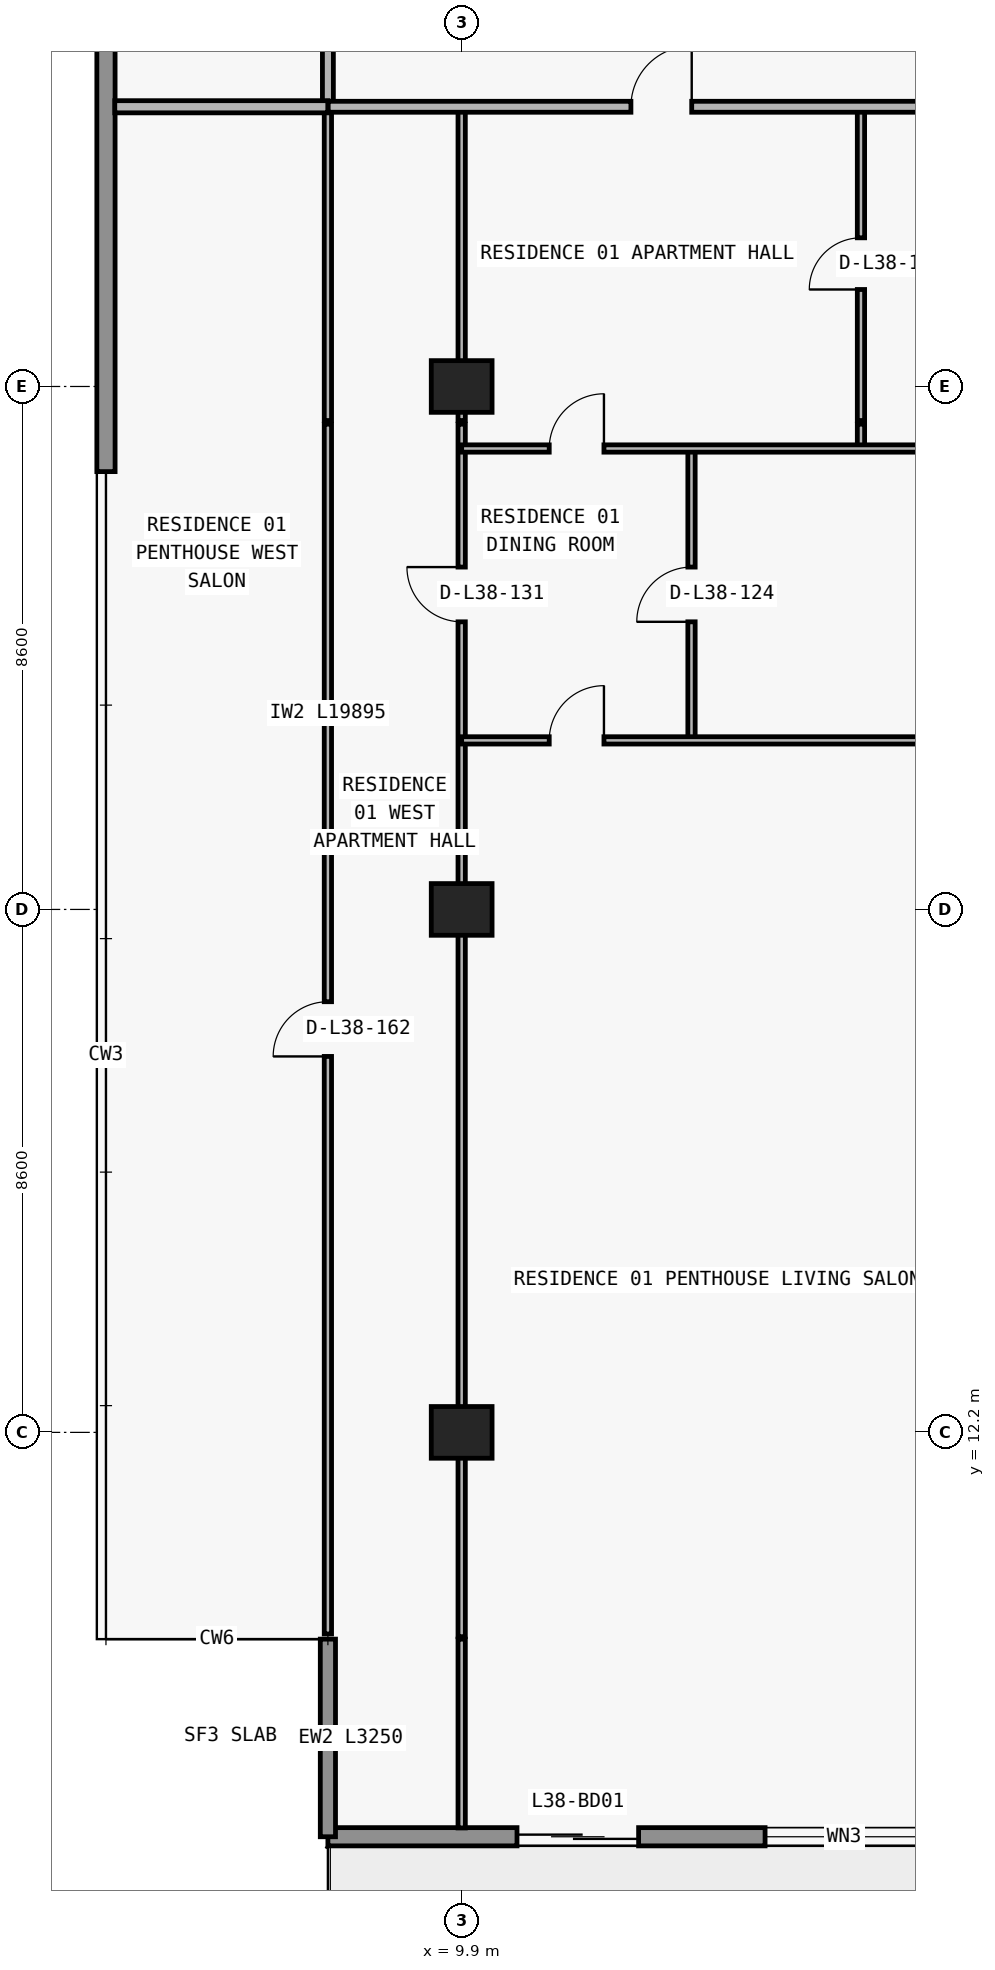
"""IFC4 building model, lengths in metres.
Left out: names, types, materials, properties, quantities, classifications, styles, units other than length and angle.
Written with IfcOpenShell. Run it as: python <this file> out.ifc"""

import sys

from ifc_helpers import new_model, si_unit, direction, frame, frame_2d, origin, origin_2d, place, context, subcontext, project, spatial, rectangle, extrude, element, fill, save


model = new_model("IFC4")
c1 = context("Model", 3, precision=1e-05, world=origin(), true_north=direction((0.0, 1.0)))
c2 = subcontext(c1, "Body", "Model", "MODEL_VIEW")
j1 = project(units=[si_unit("LENGTHUNIT", "METRE"), si_unit("PLANEANGLEUNIT", "RADIAN")], contexts=[c1])
p1 = place(None, origin())
s1 = spatial("IfcSite", under=j1, at=p1, CompositionType="ELEMENT")
p2 = place(p1, origin())
s2 = spatial("IfcBuilding", under=s1, at=p2, CompositionType="ELEMENT")
p3 = place(p2, frame((0.0, 0.0, 138.9)))
s3 = spatial("IfcBuildingStorey", under=s2, at=p3, CompositionType="ELEMENT", Elevation=138.9)
for number, where, z_axis, x_axis in (
    (1, (9.9, 12.2, 0.0), (0.0, 0.0, 1.0), (1.0, 0.0, 0.0)),
    (2, (9.9, 20.8, 0.0), (0.0, 0.0, 1.0), (1.0, 0.0, 0.0)),
    (3, (9.9, 29.4, 0.0), (0.0, 0.0, 1.0), (1.0, 0.0, 0.0)),
):
    element("IfcColumn", number, at=place(p3, frame(where, z_axis=z_axis, x_axis=x_axis)), inside=s3, PredefinedType="COLUMN", context=c2, shape_type="SweptSolid", body=[
        extrude(rectangle(XDim=1.0, YDim=0.85, at=origin_2d()), origin(), (0.0, 0.0, 1.0), 3.05),
    ])
p4 = place(p3, frame((70.1, 5.55, 0.0), z_axis=(0.0, 0.0, 1.0), x_axis=(-1.0, 0.0, 0.0)))
e4 = element("IfcWall", 4, at=p4, inside=s3, PredefinedType="STANDARD", context=c2, shape_type="SweptSolid", body=[
    extrude(rectangle(XDim=62.4, YDim=0.3, at=frame_2d((31.2, 0.0))), origin(), (0.0, 0.0, 1.0), 3.05),
])
p5 = place(p4, frame((57.29, 0.0, 0.0)))
e5 = element("IfcOpeningElement", 5, at=p5, cuts=e4, PredefinedType="OPENING", context=c2, shape_type="SweptSolid", body=[
    extrude(rectangle(XDim=2.0, YDim=2.3, at=frame_2d((1.0, 1.15))), frame((0.0, 0.16, 0.0), z_axis=(0.0, -1.0, 0.0), x_axis=(1.0, 0.0, 0.0)), (0.0, 0.0, 1.0), 0.32),
])
p6 = place(p4, frame((52.61, 0.0, 0.65)))
e6 = element("IfcOpeningElement", 6, at=p6, cuts=e4, PredefinedType="OPENING", context=c2, shape_type="SweptSolid", body=[
    extrude(rectangle(XDim=2.6, YDim=1.85, at=frame_2d((1.3, 0.925))), frame((0.0, 0.16, 0.0), z_axis=(0.0, -1.0, 0.0), x_axis=(1.0, 0.0, 0.0)), (0.0, 0.0, 1.0), 0.32),
])
p7 = place(p4, frame((46.5, 0.0, 0.85)))
e7 = element("IfcOpeningElement", 7, at=p7, cuts=e4, PredefinedType="OPENING", context=c2, shape_type="SweptSolid", body=[
    extrude(rectangle(XDim=2.2, YDim=1.55, at=frame_2d((1.1, 0.775))), frame((0.0, 0.16, 0.0), z_axis=(0.0, -1.0, 0.0), x_axis=(1.0, 0.0, 0.0)), (0.0, 0.0, 1.0), 0.32),
])
p8 = place(p4, frame((40.49, 0.0, 0.0)))
e8 = element("IfcOpeningElement", 8, at=p8, cuts=e4, PredefinedType="OPENING", context=c2, shape_type="SweptSolid", body=[
    extrude(rectangle(XDim=2.0, YDim=2.3, at=frame_2d((1.0, 1.15))), frame((0.0, 0.16, 0.0), z_axis=(0.0, -1.0, 0.0), x_axis=(1.0, 0.0, 0.0)), (0.0, 0.0, 1.0), 0.32),
])
p9 = place(p4, frame((35.81, 0.0, 0.65)))
e9 = element("IfcOpeningElement", 9, at=p9, cuts=e4, PredefinedType="OPENING", context=c2, shape_type="SweptSolid", body=[
    extrude(rectangle(XDim=2.6, YDim=1.85, at=frame_2d((1.3, 0.925))), frame((0.0, 0.16, 0.0), z_axis=(0.0, -1.0, 0.0), x_axis=(1.0, 0.0, 0.0)), (0.0, 0.0, 1.0), 0.32),
])
p10 = place(p4, frame((30.1, 0.0, 0.85)))
e10 = element("IfcOpeningElement", 10, at=p10, cuts=e4, PredefinedType="OPENING", context=c2, shape_type="SweptSolid", body=[
    extrude(rectangle(XDim=2.2, YDim=1.55, at=frame_2d((1.1, 0.775))), frame((0.0, 0.16, 0.0), z_axis=(0.0, -1.0, 0.0), x_axis=(1.0, 0.0, 0.0)), (0.0, 0.0, 1.0), 0.32),
])
p11 = place(p4, frame((22.1, 0.0, 0.85)))
e11 = element("IfcOpeningElement", 11, at=p11, cuts=e4, PredefinedType="OPENING", context=c2, shape_type="SweptSolid", body=[
    extrude(rectangle(XDim=2.2, YDim=1.55, at=frame_2d((1.1, 0.775))), frame((0.0, 0.16, 0.0), z_axis=(0.0, -1.0, 0.0), x_axis=(1.0, 0.0, 0.0)), (0.0, 0.0, 1.0), 0.32),
])
p12 = place(p4, frame((16.026, 0.0, 0.0)))
e12 = element("IfcOpeningElement", 12, at=p12, cuts=e4, PredefinedType="OPENING", context=c2, shape_type="SweptSolid", body=[
    extrude(rectangle(XDim=2.0, YDim=2.3, at=frame_2d((1.0, 1.15))), frame((0.0, 0.16, 0.0), z_axis=(0.0, -1.0, 0.0), x_axis=(1.0, 0.0, 0.0)), (0.0, 0.0, 1.0), 0.32),
])
p13 = place(p4, frame((11.726, 0.0, 0.85)))
e13 = element("IfcOpeningElement", 13, at=p13, cuts=e4, PredefinedType="OPENING", context=c2, shape_type="SweptSolid", body=[
    extrude(rectangle(XDim=2.2, YDim=1.55, at=frame_2d((1.1, 0.775))), frame((0.0, 0.16, 0.0), z_axis=(0.0, -1.0, 0.0), x_axis=(1.0, 0.0, 0.0)), (0.0, 0.0, 1.0), 0.32),
])
p14 = place(p4, frame((7.29, 0.0, 0.0)))
e14 = element("IfcOpeningElement", 14, at=p14, cuts=e4, PredefinedType="OPENING", context=c2, shape_type="SweptSolid", body=[
    extrude(rectangle(XDim=2.0, YDim=2.3, at=frame_2d((1.0, 1.15))), frame((0.0, 0.16, 0.0), z_axis=(0.0, -1.0, 0.0), x_axis=(1.0, 0.0, 0.0)), (0.0, 0.0, 1.0), 0.32),
])
p15 = place(p4, frame((3.19, 0.0, 0.85)))
e15 = element("IfcOpeningElement", 15, at=p15, cuts=e4, PredefinedType="OPENING", context=c2, shape_type="SweptSolid", body=[
    extrude(rectangle(XDim=1.8, YDim=1.55, at=frame_2d((0.9, 0.775))), frame((0.0, 0.16, 0.0), z_axis=(0.0, -1.0, 0.0), x_axis=(1.0, 0.0, 0.0)), (0.0, 0.0, 1.0), 0.32),
])
p16 = place(p3, frame((7.7, 8.8, 0.0), z_axis=(0.0, 0.0, 1.0), x_axis=(0.0, -1.0, 0.0)))
e16 = element("IfcWall", 16, at=p16, inside=s3, PredefinedType="ELEMENTEDWALL", context=c2, shape_type="SweptSolid", body=[
    extrude(rectangle(XDim=3.25, YDim=0.25, at=frame_2d((1.625, 0.0))), origin(), (0.0, 0.0, 1.0), 3.05),
])
p17 = place(p3, frame((4.05, 28.0, 0.0), z_axis=(0.0, 0.0, 1.0), x_axis=(0.0, 1.0, 0.0)))
e17 = element("IfcWall", 17, at=p17, inside=s3, PredefinedType="STANDARD", context=c2, shape_type="SweptSolid", body=[
    extrude(rectangle(XDim=19.2, YDim=0.3, at=frame_2d((9.6, 0.0))), origin(), (0.0, 0.0, 1.0), 3.05),
])
p18 = place(p3, frame((7.7, 8.885, 0.0), z_axis=(0.0, 0.0, 1.0), x_axis=(0.0, 1.0, 0.0)))
e18 = element("IfcWall", 18, at=p18, inside=s3, PredefinedType="PARTITIONING", context=c2, shape_type="SweptSolid", body=[
    extrude(rectangle(XDim=19.895, YDim=0.12, at=frame_2d((9.948, 0.0))), origin(), (0.0, 0.0, 1.0), 3.05),
])
p19 = place(p18, frame((9.498, 0.0, 0.0)))
e19 = element("IfcOpeningElement", 19, at=p19, cuts=e18, PredefinedType="OPENING", context=c2, shape_type="SweptSolid", body=[
    extrude(rectangle(XDim=0.9, YDim=2.15, at=frame_2d((0.45, 1.075))), frame((0.0, 0.07, 0.0), z_axis=(0.0, -1.0, 0.0), x_axis=(1.0, 0.0, 0.0)), (0.0, 0.0, 1.0), 0.14),
])
p20 = place(p3, frame((7.7, 28.84, 0.0), z_axis=(0.0, 0.0, 1.0), x_axis=(0.0, 1.0, 0.0)))
e20 = element("IfcWall", 20, at=p20, inside=s3, PredefinedType="PARTITIONING", context=c2, shape_type="SweptSolid", body=[
    extrude(rectangle(XDim=5.16, YDim=0.12, at=frame_2d((2.58, 0.0))), origin(), (0.0, 0.0, 1.0), 3.05),
])
p21 = place(p3, frame((7.7, 34.005, 0.0), z_axis=(0.0, 0.0, 1.0), x_axis=(0.0, 1.0, 0.0)))
e21 = element("IfcWall", 21, at=p21, inside=s3, PredefinedType="PARTITIONING", context=c2, shape_type="SweptSolid", body=[
    extrude(rectangle(XDim=2.945, YDim=0.18, at=frame_2d((1.473, 0.0))), origin(), (0.0, 0.0, 1.0), 3.05),
])
p22 = place(p3, frame((9.9, 5.695, 0.0), z_axis=(0.0, 0.0, 1.0), x_axis=(0.0, 1.0, 0.0)))
e22 = element("IfcWall", 22, at=p22, inside=s3, PredefinedType="PARTITIONING", context=c2, shape_type="SweptSolid", body=[
    extrude(rectangle(XDim=3.105, YDim=0.12, at=frame_2d((1.552, 0.0))), origin(), (0.0, 0.0, 1.0), 3.05),
])
p23 = place(p3, frame((9.9, 8.84, 0.0), z_axis=(0.0, 0.0, 1.0), x_axis=(0.0, 1.0, 0.0)))
e23 = element("IfcWall", 23, at=p23, inside=s3, PredefinedType="PARTITIONING", context=c2, shape_type="SweptSolid", body=[
    extrude(rectangle(XDim=19.94, YDim=0.12, at=frame_2d((9.97, 0.0))), origin(), (0.0, 0.0, 1.0), 2.174),
])
p24 = place(p23, frame((16.69, 0.0, 0.0)))
e24 = element("IfcOpeningElement", 24, at=p24, cuts=e23, PredefinedType="OPENING", context=c2, shape_type="SweptSolid", body=[
    extrude(rectangle(XDim=0.9, YDim=2.124, at=frame_2d((0.45, 1.062))), frame((0.0, 0.07, 0.0), z_axis=(0.0, -1.0, 0.0), x_axis=(1.0, 0.0, 0.0)), (0.0, 0.0, 1.0), 0.14),
])
p25 = place(p3, frame((9.9, 28.84, 0.0), z_axis=(0.0, 0.0, 1.0), x_axis=(0.0, 1.0, 0.0)))
e25 = element("IfcWall", 25, at=p25, inside=s3, PredefinedType="PARTITIONING", context=c2, shape_type="SweptSolid", body=[
    extrude(rectangle(XDim=5.16, YDim=0.12, at=frame_2d((2.58, 0.0))), origin(), (0.0, 0.0, 1.0), 2.174),
])
p26 = place(p3, frame((13.68, 23.58, 0.0), z_axis=(0.0, 0.0, 1.0), x_axis=(0.0, 1.0, 0.0)))
e26 = element("IfcWall", 26, at=p26, inside=s3, PredefinedType="PARTITIONING", context=c2, shape_type="SweptSolid", body=[
    extrude(rectangle(XDim=4.8, YDim=0.12, at=frame_2d((2.4, 0.0))), origin(), (0.0, 0.0, 1.0), 3.05),
])
p27 = place(p26, frame((1.95, 0.0, 0.0)))
e27 = element("IfcOpeningElement", 27, at=p27, cuts=e26, PredefinedType="OPENING", context=c2, shape_type="SweptSolid", body=[
    extrude(rectangle(XDim=0.9, YDim=2.15, at=frame_2d((0.45, 1.075))), frame((0.0, 0.07, 0.0), z_axis=(0.0, -1.0, 0.0), x_axis=(1.0, 0.0, 0.0)), (0.0, 0.0, 1.0), 0.14),
])
p28 = place(p3, frame((16.467, 28.38, 0.0), z_axis=(0.0, 0.0, 1.0), x_axis=(0.0, 1.0, 0.0)))
e28 = element("IfcWall", 28, at=p28, inside=s3, PredefinedType="PARTITIONING", context=c2, shape_type="SweptSolid", body=[
    extrude(rectangle(XDim=0.4, YDim=0.12, at=frame_2d((0.2, 0.0))), origin(), (0.0, 0.0, 1.0), 3.05),
])
p29 = place(p3, frame((16.467, 28.84, 0.0), z_axis=(0.0, 0.0, 1.0), x_axis=(0.0, 1.0, 0.0)))
e29 = element("IfcWall", 29, at=p29, inside=s3, PredefinedType="PARTITIONING", context=c2, shape_type="SweptSolid", body=[
    extrude(rectangle(XDim=5.16, YDim=0.12, at=frame_2d((2.58, 0.0))), origin(), (0.0, 0.0, 1.0), 3.05),
])
p30 = place(p29, frame((2.155, 0.0, 0.0)))
e30 = element("IfcOpeningElement", 30, at=p30, cuts=e29, PredefinedType="OPENING", context=c2, shape_type="SweptSolid", body=[
    extrude(rectangle(XDim=0.85, YDim=2.1, at=frame_2d((0.425, 1.05))), frame((0.0, 0.07, 0.0), z_axis=(0.0, -1.0, 0.0), x_axis=(1.0, 0.0, 0.0)), (0.0, 0.0, 1.0), 0.14),
])
p31 = place(p3, frame((9.9, 23.58, 0.0), z_axis=(0.0, 0.0, 1.0), x_axis=(1.0, 0.0, 0.0)))
e31 = element("IfcWall", 31, at=p31, inside=s3, PredefinedType="PARTITIONING", context=c2, shape_type="SweptSolid", body=[
    extrude(rectangle(XDim=8.35, YDim=0.12, at=frame_2d((4.175, 0.0))), origin(), (0.0, 0.0, 1.0), 3.05),
])
p32 = place(p31, frame((1.44, 0.0, 0.0)))
e32 = element("IfcOpeningElement", 32, at=p32, cuts=e31, PredefinedType="OPENING", context=c2, shape_type="SweptSolid", body=[
    extrude(rectangle(XDim=0.9, YDim=2.15, at=frame_2d((0.45, 1.075))), frame((0.0, 0.07, 0.0), z_axis=(0.0, -1.0, 0.0), x_axis=(1.0, 0.0, 0.0)), (0.0, 0.0, 1.0), 0.14),
])
p33 = place(p3, frame((9.9, 28.38, 0.0), z_axis=(0.0, 0.0, 1.0), x_axis=(1.0, 0.0, 0.0)))
e33 = element("IfcWall", 33, at=p33, inside=s3, PredefinedType="PARTITIONING", context=c2, shape_type="SweptSolid", body=[
    extrude(rectangle(XDim=8.35, YDim=0.12, at=frame_2d((4.175, 0.0))), origin(), (0.0, 0.0, 1.0), 3.05),
])
p34 = place(p33, frame((1.44, 0.0, 0.0)))
e34 = element("IfcOpeningElement", 34, at=p34, cuts=e33, PredefinedType="OPENING", context=c2, shape_type="SweptSolid", body=[
    extrude(rectangle(XDim=0.9, YDim=2.15, at=frame_2d((0.45, 1.075))), frame((0.0, 0.07, 0.0), z_axis=(0.0, -1.0, 0.0), x_axis=(1.0, 0.0, 0.0)), (0.0, 0.0, 1.0), 0.14),
])
p35 = place(p3, frame((4.195, 34.0, 0.0), z_axis=(0.0, 0.0, 1.0), x_axis=(1.0, 0.0, 0.0)))
e35 = element("IfcWall", 35, at=p35, inside=s3, PredefinedType="PARTITIONING", context=c2, shape_type="SweptSolid", body=[
    extrude(rectangle(XDim=3.505, YDim=0.2, at=frame_2d((1.752, 0.0))), origin(), (0.0, 0.0, 1.0), 3.05),
])
p36 = place(p3, frame((7.705, 34.0, 0.0), z_axis=(0.0, 0.0, 1.0), x_axis=(1.0, 0.0, 0.0)))
e36 = element("IfcWall", 36, at=p36, inside=s3, PredefinedType="PARTITIONING", context=c2, shape_type="SweptSolid", body=[
    extrude(rectangle(XDim=10.545, YDim=0.18, at=frame_2d((5.272, 0.0))), origin(), (0.0, 0.0, 1.0), 3.05),
])
p37 = place(p36, frame((4.979, 0.0, 0.0)))
e37 = element("IfcOpeningElement", 37, at=p37, cuts=e36, PredefinedType="OPENING", context=c2, shape_type="SweptSolid", body=[
    extrude(rectangle(XDim=1.0, YDim=2.2, at=frame_2d((0.5, 1.1))), frame((0.0, 0.1, 0.0), z_axis=(0.0, -1.0, 0.0), x_axis=(1.0, 0.0, 0.0)), (0.0, 0.0, 1.0), 0.2),
])
p38 = place(p5, origin())
e38 = element("IfcDoor", 38, at=p38, inside=s3, OperationType="DOUBLE_DOOR_SLIDING", PredefinedType="DOOR", context=c2, shape_type="SweptSolid", body=[
    extrude(rectangle(XDim=2.0, YDim=2.3, at=frame_2d((1.0, 1.15))), frame((0.0, 0.025, 0.0), z_axis=(0.0, -1.0, 0.0), x_axis=(1.0, 0.0, 0.0)), (0.0, 0.0, 1.0), 0.05),
])
fill(e5, e38)
p39 = place(p6, origin())
e39 = element("IfcWindow", 39, at=p39, inside=s3, PartitioningType="SINGLE_PANEL", PredefinedType="WINDOW", context=c2, shape_type="SweptSolid", body=[
    extrude(rectangle(XDim=2.6, YDim=1.85, at=frame_2d((1.3, 0.925))), frame((0.0, 0.03, 0.0), z_axis=(0.0, -1.0, 0.0), x_axis=(1.0, 0.0, 0.0)), (0.0, 0.0, 1.0), 0.06),
])
fill(e6, e39)
p40 = place(p37, origin())
e40 = element("IfcDoor", 40, at=p40, inside=s3, OperationType="SINGLE_SWING_RIGHT", PredefinedType="DOOR", context=c2, shape_type="SweptSolid", body=[
    extrude(rectangle(XDim=1.0, YDim=2.2, at=frame_2d((0.5, 1.1))), frame((0.0, 0.025, 0.0), z_axis=(0.0, -1.0, 0.0), x_axis=(1.0, 0.0, 0.0)), (0.0, 0.0, 1.0), 0.05),
])
fill(e37, e40)
p41 = place(p30, origin())
e41 = element("IfcDoor", 41, at=p41, inside=s3, OperationType="SINGLE_SWING_LEFT", PredefinedType="DOOR", context=c2, shape_type="SweptSolid", body=[
    extrude(rectangle(XDim=0.85, YDim=2.1, at=frame_2d((0.425, 1.05))), frame((0.0, 0.025, 0.0), z_axis=(0.0, -1.0, 0.0), x_axis=(1.0, 0.0, 0.0)), (0.0, 0.0, 1.0), 0.05),
])
fill(e30, e41)
p42 = place(p34, origin())
e42 = element("IfcDoor", 42, at=p42, inside=s3, OperationType="SINGLE_SWING_RIGHT", PredefinedType="DOOR", context=c2, shape_type="SweptSolid", body=[
    extrude(rectangle(XDim=0.9, YDim=2.15, at=frame_2d((0.45, 1.075))), frame((0.0, 0.025, 0.0), z_axis=(0.0, -1.0, 0.0), x_axis=(1.0, 0.0, 0.0)), (0.0, 0.0, 1.0), 0.05),
])
fill(e34, e42)
p43 = place(p27, origin())
e43 = element("IfcDoor", 43, at=p43, inside=s3, OperationType="SINGLE_SWING_LEFT", PredefinedType="DOOR", context=c2, shape_type="SweptSolid", body=[
    extrude(rectangle(XDim=0.9, YDim=2.15, at=frame_2d((0.45, 1.075))), frame((0.0, 0.025, 0.0), z_axis=(0.0, -1.0, 0.0), x_axis=(1.0, 0.0, 0.0)), (0.0, 0.0, 1.0), 0.05),
])
fill(e27, e43)
p44 = place(p32, origin())
e44 = element("IfcDoor", 44, at=p44, inside=s3, OperationType="SINGLE_SWING_RIGHT", PredefinedType="DOOR", context=c2, shape_type="SweptSolid", body=[
    extrude(rectangle(XDim=0.9, YDim=2.15, at=frame_2d((0.45, 1.075))), frame((0.0, 0.025, 0.0), z_axis=(0.0, -1.0, 0.0), x_axis=(1.0, 0.0, 0.0)), (0.0, 0.0, 1.0), 0.05),
])
fill(e32, e44)
p45 = place(p24, origin())
e45 = element("IfcDoor", 45, at=p45, inside=s3, OperationType="SINGLE_SWING_RIGHT", PredefinedType="DOOR", context=c2, shape_type="SweptSolid", body=[
    extrude(rectangle(XDim=0.9, YDim=2.124, at=frame_2d((0.45, 1.062))), frame((0.0, 0.025, 0.0), z_axis=(0.0, -1.0, 0.0), x_axis=(1.0, 0.0, 0.0)), (0.0, 0.0, 1.0), 0.05),
])
fill(e24, e45)
p46 = place(p19, origin())
e46 = element("IfcDoor", 46, at=p46, inside=s3, OperationType="SINGLE_SWING_LEFT", PredefinedType="DOOR", context=c2, shape_type="SweptSolid", body=[
    extrude(rectangle(XDim=0.9, YDim=2.15, at=frame_2d((0.45, 1.075))), frame((0.0, 0.025, 0.0), z_axis=(0.0, -1.0, 0.0), x_axis=(1.0, 0.0, 0.0)), (0.0, 0.0, 1.0), 0.05),
])
fill(e19, e46)
save(model, sys.argv[1])
